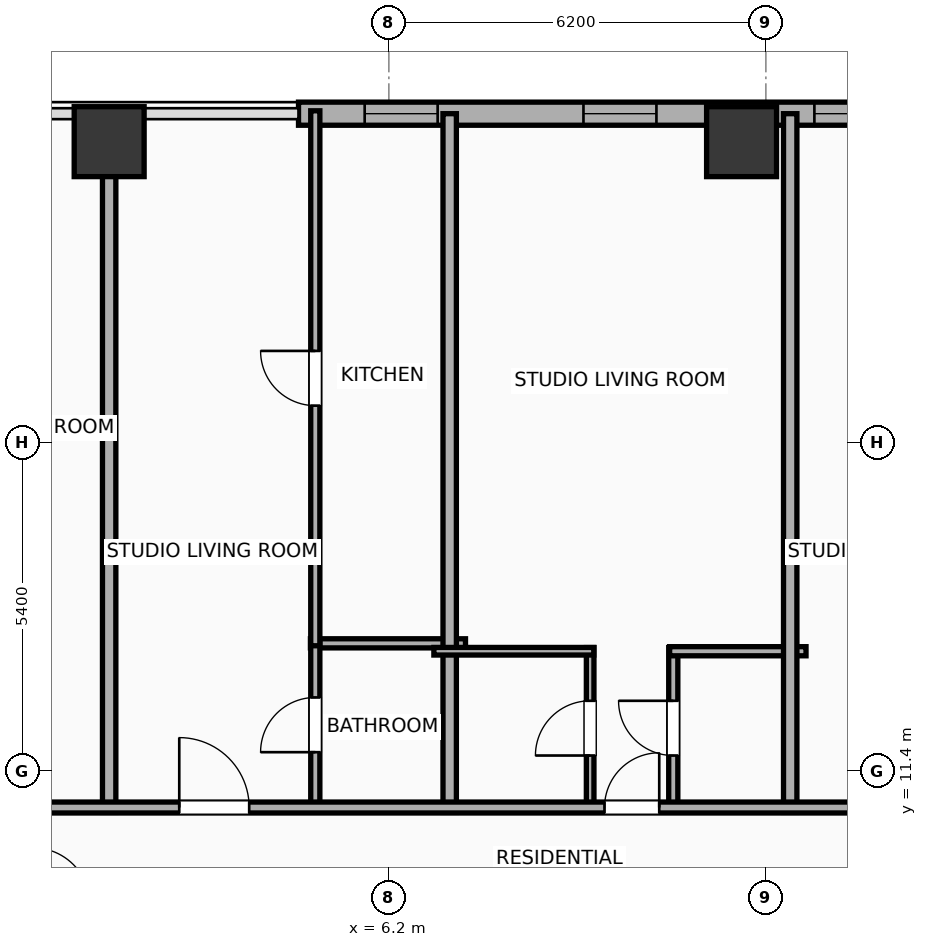
"""IFC4 building model, lengths in metres.
Left out: names, types, materials, properties, quantities, classifications, styles, units other than length and angle.
Written with IfcOpenShell. Run it as: python <this file> out.ifc"""

import sys

from ifc_helpers import new_model, si_unit, direction, frame, frame_2d, origin, origin_2d, place, context, subcontext, project, spatial, rectangle, hollow_rectangle, extrude, element, fill, save


model = new_model("IFC4")
c1 = context("Model", 3, precision=1e-05, world=origin(), true_north=direction((0.0, 1.0)))
c2 = subcontext(c1, "Body", "Model", "MODEL_VIEW")
j1 = project(units=[si_unit("LENGTHUNIT", "METRE"), si_unit("PLANEANGLEUNIT", "RADIAN")], contexts=[c1])
p1 = place(None, origin())
s1 = spatial("IfcSite", under=j1, at=p1, CompositionType="ELEMENT")
p2 = place(p1, origin())
s2 = spatial("IfcBuilding", under=s1, at=p2, CompositionType="ELEMENT")
p3 = place(p2, frame((0.0, 0.0, 61.1)))
s3 = spatial("IfcBuildingStorey", under=s2, at=p3, CompositionType="ELEMENT", Elevation=61.1)
for number, where, z_axis, x_axis in (
    (1, (12.0, 21.75, 0.0), (0.0, 0.0, 1.0), (1.0, 0.0, 0.0)),
    (2, (1.6, 21.75, 0.0), (0.0, 0.0, 1.0), (1.0, 0.0, 0.0)),
):
    element("IfcColumn", number, at=place(p3, frame(where, z_axis=z_axis, x_axis=x_axis)), inside=s3, PredefinedType="COLUMN", context=c2, shape_type="SweptSolid", body=[
        extrude(hollow_rectangle(XDim=1.15, YDim=1.15, WallThickness=0.04, at=origin_2d()), origin(), (0.0, 0.0, 1.0), 3.9),
    ])
p4 = place(p3, frame((4.714, 22.21, 0.0), z_axis=(0.0, 0.0, 1.0), x_axis=(1.0, 0.0, 0.0)))
e3 = element("IfcWall", 3, at=p4, inside=s3, PredefinedType="ELEMENTEDWALL", context=c2, shape_type="SweptSolid", body=[
    extrude(rectangle(XDim=17.667, YDim=0.38, at=frame_2d((8.833, 0.0))), origin(), (0.0, 0.0, 1.0), 3.65),
])
p5 = place(p4, frame((8.484, 0.0, 0.75)))
e4 = element("IfcOpeningElement", 4, at=p5, cuts=e3, PredefinedType="OPENING", context=c2, shape_type="SweptSolid", body=[
    extrude(rectangle(XDim=2.4, YDim=2.1, at=frame_2d((1.2, 1.05))), frame((0.0, 0.2, 0.0), z_axis=(0.0, -1.0, 0.0), x_axis=(1.0, 0.0, 0.0)), (0.0, 0.0, 1.0), 0.4),
])
p6 = place(p4, frame((1.088, 0.0, 0.75)))
e5 = element("IfcOpeningElement", 5, at=p6, cuts=e3, PredefinedType="OPENING", context=c2, shape_type="SweptSolid", body=[
    extrude(rectangle(XDim=1.2, YDim=2.05, at=frame_2d((0.6, 1.025))), frame((0.0, 0.2, 0.0), z_axis=(0.0, -1.0, 0.0), x_axis=(1.0, 0.0, 0.0)), (0.0, 0.0, 1.0), 0.4),
])
p7 = place(p4, frame((4.686, 0.0, 0.75)))
e6 = element("IfcOpeningElement", 6, at=p7, cuts=e3, PredefinedType="OPENING", context=c2, shape_type="SweptSolid", body=[
    extrude(rectangle(XDim=1.2, YDim=2.05, at=frame_2d((0.6, 1.025))), frame((0.0, 0.2, 0.0), z_axis=(0.0, -1.0, 0.0), x_axis=(1.0, 0.0, 0.0)), (0.0, 0.0, 1.0), 0.4),
])
p8 = place(p4, frame((11.981, 0.0, 0.75)))
e7 = element("IfcOpeningElement", 7, at=p8, cuts=e3, PredefinedType="OPENING", context=c2, shape_type="SweptSolid", body=[
    extrude(rectangle(XDim=1.2, YDim=2.05, at=frame_2d((0.6, 1.025))), frame((0.0, 0.2, 0.0), z_axis=(0.0, -1.0, 0.0), x_axis=(1.0, 0.0, 0.0)), (0.0, 0.0, 1.0), 0.4),
])
p9 = place(p4, frame((14.632, 0.0, 0.75)))
e8 = element("IfcOpeningElement", 8, at=p9, cuts=e3, PredefinedType="OPENING", context=c2, shape_type="SweptSolid", body=[
    extrude(rectangle(XDim=1.2, YDim=2.05, at=frame_2d((0.6, 1.025))), frame((0.0, 0.2, 0.0), z_axis=(0.0, -1.0, 0.0), x_axis=(1.0, 0.0, 0.0)), (0.0, 0.0, 1.0), 0.4),
])
p10 = place(p3, frame((1.6, 10.72, 0.0), z_axis=(0.0, 0.0, 1.0), x_axis=(0.0, 1.0, 0.0)))
e9 = element("IfcWall", 9, at=p10, inside=s3, PredefinedType="PARTITIONING", context=c2, shape_type="SweptSolid", body=[
    extrude(rectangle(XDim=11.49, YDim=0.22, at=frame_2d((5.745, 0.0))), origin(), (0.0, 0.0, 1.0), 2.94),
])
p11 = place(p3, frame((4.91, 13.5, 0.0), z_axis=(0.0, 0.0, 1.0), x_axis=(1.0, 0.0, 0.0)))
e10 = element("IfcWall", 10, at=p11, inside=s3, PredefinedType="PLUMBINGWALL", context=c2, shape_type="SweptSolid", body=[
    extrude(rectangle(XDim=2.55, YDim=0.15, at=frame_2d((1.275, 0.0))), origin(), (0.0, 0.0, 1.0), 3.65),
])
p12 = place(p3, frame((4.99, 10.78, 0.0), z_axis=(0.0, 0.0, 1.0), x_axis=(0.0, 1.0, 0.0)))
e11 = element("IfcWall", 11, at=p12, inside=s3, PredefinedType="PLUMBINGWALL", context=c2, shape_type="SweptSolid", body=[
    extrude(rectangle(XDim=2.76, YDim=0.15, at=frame_2d((1.38, 0.0))), origin(), (0.0, 0.0, 1.0), 3.65),
])
p13 = place(p12, frame((0.93, 0.0, 0.0)))
e12 = element("IfcOpeningElement", 12, at=p13, cuts=e11, PredefinedType="OPENING", context=c2, shape_type="SweptSolid", body=[
    extrude(rectangle(XDim=0.9, YDim=2.05, at=frame_2d((0.45, 1.025))), frame((0.0, 0.085, 0.0), z_axis=(0.0, -1.0, 0.0), x_axis=(1.0, 0.0, 0.0)), (0.0, 0.0, 1.0), 0.17),
])
p14 = place(p3, frame((4.99, 13.46, 0.0), z_axis=(0.0, 0.0, 1.0), x_axis=(0.0, 1.0, 0.0)))
e13 = element("IfcWall", 13, at=p14, inside=s3, PredefinedType="PLUMBINGWALL", context=c2, shape_type="SweptSolid", body=[
    extrude(rectangle(XDim=8.798, YDim=0.15, at=frame_2d((4.399, 0.0))), origin(), (0.0, 0.0, 1.0), 3.65),
])
p15 = place(p14, frame((3.949, 0.0, 0.0)))
e14 = element("IfcOpeningElement", 14, at=p15, cuts=e13, PredefinedType="OPENING", context=c2, shape_type="SweptSolid", body=[
    extrude(rectangle(XDim=0.9, YDim=2.05, at=frame_2d((0.45, 1.025))), frame((0.0, 0.085, 0.0), z_axis=(0.0, -1.0, 0.0), x_axis=(1.0, 0.0, 0.0)), (0.0, 0.0, 1.0), 0.17),
])
p16 = place(p3, frame((7.2, 10.72, 0.0), z_axis=(0.0, 0.0, 1.0), x_axis=(0.0, 1.0, 0.0)))
e15 = element("IfcWall", 15, at=p16, inside=s3, PredefinedType="PARTITIONING", context=c2, shape_type="SweptSolid", body=[
    extrude(rectangle(XDim=11.49, YDim=0.22, at=frame_2d((5.745, 0.0))), origin(), (0.0, 0.0, 1.0), 3.65),
])
p17 = place(p3, frame((9.51, 10.78, 0.0), z_axis=(0.0, 0.0, 1.0), x_axis=(0.0, 1.0, 0.0)))
e16 = element("IfcWall", 16, at=p17, inside=s3, PredefinedType="PARTITIONING", context=c2, shape_type="SweptSolid", body=[
    extrude(rectangle(XDim=2.65, YDim=0.125, at=frame_2d((1.325, 0.0))), origin(), (0.0, 0.0, 1.0), 3.65),
])
p18 = place(p17, frame((0.875, 0.0, 0.0)))
e17 = element("IfcOpeningElement", 17, at=p18, cuts=e16, PredefinedType="OPENING", context=c2, shape_type="SweptSolid", body=[
    extrude(rectangle(XDim=0.9, YDim=2.05, at=frame_2d((0.45, 1.025))), frame((0.0, 0.073, 0.0), z_axis=(0.0, -1.0, 0.0), x_axis=(1.0, 0.0, 0.0)), (0.0, 0.0, 1.0), 0.145),
])
p19 = place(p3, frame((10.877, 10.78, 0.0), z_axis=(0.0, 0.0, 1.0), x_axis=(0.0, 1.0, 0.0)))
e18 = element("IfcWall", 18, at=p19, inside=s3, PredefinedType="PLUMBINGWALL", context=c2, shape_type="SweptSolid", body=[
    extrude(rectangle(XDim=2.65, YDim=0.15, at=frame_2d((1.325, 0.0))), origin(), (0.0, 0.0, 1.0), 3.65),
])
p20 = place(p19, frame((0.875, 0.0, 0.0)))
e19 = element("IfcOpeningElement", 19, at=p20, cuts=e18, PredefinedType="OPENING", context=c2, shape_type="SweptSolid", body=[
    extrude(rectangle(XDim=0.9, YDim=2.05, at=frame_2d((0.45, 1.025))), frame((0.0, 0.085, 0.0), z_axis=(0.0, -1.0, 0.0), x_axis=(1.0, 0.0, 0.0)), (0.0, 0.0, 1.0), 0.17),
])
p21 = place(p3, frame((6.94, 13.37, 0.0), z_axis=(0.0, 0.0, 1.0), x_axis=(1.0, 0.0, 0.0)))
e20 = element("IfcWall", 20, at=p21, inside=s3, PredefinedType="PARTITIONING", context=c2, shape_type="SweptSolid", body=[
    extrude(rectangle(XDim=2.63, YDim=0.125, at=frame_2d((1.315, 0.0))), origin(), (0.0, 0.0, 1.0), 3.65),
])
p22 = place(p3, frame((10.817, 13.37, 0.0), z_axis=(0.0, 0.0, 1.0), x_axis=(1.0, 0.0, 0.0)))
e21 = element("IfcWall", 21, at=p22, inside=s3, PredefinedType="PLUMBINGWALL", context=c2, shape_type="SweptSolid", body=[
    extrude(rectangle(XDim=2.243, YDim=0.15, at=frame_2d((1.122, 0.0))), origin(), (0.0, 0.0, 1.0), 3.65),
])
p23 = place(p3, frame((12.8, 10.72, 0.0), z_axis=(0.0, 0.0, 1.0), x_axis=(0.0, 1.0, 0.0)))
e22 = element("IfcWall", 22, at=p23, inside=s3, PredefinedType="PARTITIONING", context=c2, shape_type="SweptSolid", body=[
    extrude(rectangle(XDim=11.49, YDim=0.22, at=frame_2d((5.745, 0.0))), origin(), (0.0, 0.0, 1.0), 3.65),
])
p24 = place(p3, frame((-33.41, 10.8, 0.0), z_axis=(0.0, 0.0, 1.0), x_axis=(1.0, 0.0, 0.0)))
e23 = element("IfcWall", 23, at=p24, inside=s3, PredefinedType="PARTITIONING", context=c2, shape_type="SweptSolid", body=[
    extrude(rectangle(XDim=59.62, YDim=0.18, at=frame_2d((29.81, 0.0))), origin(), (0.0, 0.0, 1.0), 3.65),
])
p25 = place(p24, frame((3.062, 0.0, 0.0)))
e24 = element("IfcOpeningElement", 24, at=p25, cuts=e23, PredefinedType="OPENING", context=c2, shape_type="SweptSolid", body=[
    extrude(rectangle(XDim=1.15, YDim=2.05, at=frame_2d((0.575, 1.025))), frame((0.0, 0.1, 0.0), z_axis=(0.0, -1.0, 0.0), x_axis=(1.0, 0.0, 0.0)), (0.0, 0.0, 1.0), 0.2),
])
p26 = place(p24, frame((10.312, 0.0, 0.0)))
e25 = element("IfcOpeningElement", 25, at=p26, cuts=e23, PredefinedType="OPENING", context=c2, shape_type="SweptSolid", body=[
    extrude(rectangle(XDim=1.15, YDim=2.05, at=frame_2d((0.575, 1.025))), frame((0.0, 0.1, 0.0), z_axis=(0.0, -1.0, 0.0), x_axis=(1.0, 0.0, 0.0)), (0.0, 0.0, 1.0), 0.2),
])
p27 = place(p24, frame((15.153, 0.0, 0.0)))
e26 = element("IfcOpeningElement", 26, at=p27, cuts=e23, PredefinedType="OPENING", context=c2, shape_type="SweptSolid", body=[
    extrude(rectangle(XDim=0.9, YDim=2.05, at=frame_2d((0.45, 1.025))), frame((0.0, 0.1, 0.0), z_axis=(0.0, -1.0, 0.0), x_axis=(1.0, 0.0, 0.0)), (0.0, 0.0, 1.0), 0.2),
])
p28 = place(p24, frame((21.508, 0.0, 0.0)))
e27 = element("IfcOpeningElement", 27, at=p28, cuts=e23, PredefinedType="OPENING", context=c2, shape_type="SweptSolid", body=[
    extrude(rectangle(XDim=1.15, YDim=2.05, at=frame_2d((0.575, 1.025))), frame((0.0, 0.1, 0.0), z_axis=(0.0, -1.0, 0.0), x_axis=(1.0, 0.0, 0.0)), (0.0, 0.0, 1.0), 0.2),
])
p29 = place(p24, frame((26.355, 0.0, 0.0)))
e28 = element("IfcOpeningElement", 28, at=p29, cuts=e23, PredefinedType="OPENING", context=c2, shape_type="SweptSolid", body=[
    extrude(rectangle(XDim=0.9, YDim=2.05, at=frame_2d((0.45, 1.025))), frame((0.0, 0.1, 0.0), z_axis=(0.0, -1.0, 0.0), x_axis=(1.0, 0.0, 0.0)), (0.0, 0.0, 1.0), 0.2),
])
p30 = place(p24, frame((32.753, 0.0, 0.0)))
e29 = element("IfcOpeningElement", 29, at=p30, cuts=e23, PredefinedType="OPENING", context=c2, shape_type="SweptSolid", body=[
    extrude(rectangle(XDim=1.15, YDim=2.05, at=frame_2d((0.575, 1.025))), frame((0.0, 0.1, 0.0), z_axis=(0.0, -1.0, 0.0), x_axis=(1.0, 0.0, 0.0)), (0.0, 0.0, 1.0), 0.2),
])
p31 = place(p24, frame((36.163, 0.0, 0.0)))
e30 = element("IfcOpeningElement", 30, at=p31, cuts=e23, PredefinedType="OPENING", context=c2, shape_type="SweptSolid", body=[
    extrude(rectangle(XDim=1.15, YDim=2.05, at=frame_2d((0.575, 1.025))), frame((0.0, 0.1, 0.0), z_axis=(0.0, -1.0, 0.0), x_axis=(1.0, 0.0, 0.0)), (0.0, 0.0, 1.0), 0.2),
])
p32 = place(p24, frame((43.156, 0.0, 0.0)))
e31 = element("IfcOpeningElement", 31, at=p32, cuts=e23, PredefinedType="OPENING", context=c2, shape_type="SweptSolid", body=[
    extrude(rectangle(XDim=0.9, YDim=2.05, at=frame_2d((0.45, 1.025))), frame((0.0, 0.1, 0.0), z_axis=(0.0, -1.0, 0.0), x_axis=(1.0, 0.0, 0.0)), (0.0, 0.0, 1.0), 0.2),
])
p33 = place(p24, frame((47.36, 0.0, 0.0)))
e32 = element("IfcOpeningElement", 32, at=p33, cuts=e23, PredefinedType="OPENING", context=c2, shape_type="SweptSolid", body=[
    extrude(rectangle(XDim=1.15, YDim=2.05, at=frame_2d((0.575, 1.025))), frame((0.0, 0.1, 0.0), z_axis=(0.0, -1.0, 0.0), x_axis=(1.0, 0.0, 0.0)), (0.0, 0.0, 1.0), 0.2),
])
p34 = place(p24, frame((55.337, 0.0, 0.0)))
e33 = element("IfcOpeningElement", 33, at=p34, cuts=e23, PredefinedType="OPENING", context=c2, shape_type="SweptSolid", body=[
    extrude(rectangle(XDim=1.15, YDim=2.05, at=frame_2d((0.575, 1.025))), frame((0.0, 0.1, 0.0), z_axis=(0.0, -1.0, 0.0), x_axis=(1.0, 0.0, 0.0)), (0.0, 0.0, 1.0), 0.2),
])
p35 = place(p5, origin())
e34 = element("IfcWindow", 34, at=p35, inside=s3, PartitioningType="SINGLE_PANEL", PredefinedType="WINDOW", context=c2, shape_type="SweptSolid", body=[
    extrude(rectangle(XDim=2.4, YDim=2.1, at=frame_2d((1.2, 1.05))), frame((0.0, 0.03, 0.0), z_axis=(0.0, -1.0, 0.0), x_axis=(1.0, 0.0, 0.0)), (0.0, 0.0, 1.0), 0.06),
])
fill(e4, e34)
p36 = place(p6, origin())
e35 = element("IfcWindow", 35, at=p36, inside=s3, PartitioningType="SINGLE_PANEL", PredefinedType="WINDOW", context=c2, shape_type="SweptSolid", body=[
    extrude(rectangle(XDim=1.2, YDim=2.05, at=frame_2d((0.6, 1.025))), frame((0.0, 0.03, 0.0), z_axis=(0.0, -1.0, 0.0), x_axis=(1.0, 0.0, 0.0)), (0.0, 0.0, 1.0), 0.06),
])
fill(e5, e35)
p37 = place(p7, origin())
e36 = element("IfcWindow", 36, at=p37, inside=s3, PartitioningType="SINGLE_PANEL", PredefinedType="WINDOW", context=c2, shape_type="SweptSolid", body=[
    extrude(rectangle(XDim=1.2, YDim=2.05, at=frame_2d((0.6, 1.025))), frame((0.0, 0.03, 0.0), z_axis=(0.0, -1.0, 0.0), x_axis=(1.0, 0.0, 0.0)), (0.0, 0.0, 1.0), 0.06),
])
fill(e6, e36)
p38 = place(p13, origin())
e37 = element("IfcDoor", 37, at=p38, inside=s3, OperationType="SINGLE_SWING_LEFT", PredefinedType="DOOR", context=c2, shape_type="SweptSolid", body=[
    extrude(rectangle(XDim=0.9, YDim=2.05, at=frame_2d((0.45, 1.025))), frame((0.0, 0.025, 0.0), z_axis=(0.0, -1.0, 0.0), x_axis=(1.0, 0.0, 0.0)), (0.0, 0.0, 1.0), 0.05),
])
fill(e12, e37)
p39 = place(p15, origin())
e38 = element("IfcDoor", 38, at=p39, inside=s3, OperationType="SINGLE_SWING_RIGHT", PredefinedType="DOOR", context=c2, shape_type="SweptSolid", body=[
    extrude(rectangle(XDim=0.9, YDim=2.05, at=frame_2d((0.45, 1.025))), frame((0.0, 0.025, 0.0), z_axis=(0.0, -1.0, 0.0), x_axis=(1.0, 0.0, 0.0)), (0.0, 0.0, 1.0), 0.05),
])
fill(e14, e38)
p40 = place(p18, origin())
e39 = element("IfcDoor", 39, at=p40, inside=s3, OperationType="SINGLE_SWING_LEFT", PredefinedType="DOOR", context=c2, shape_type="SweptSolid", body=[
    extrude(rectangle(XDim=0.9, YDim=2.05, at=frame_2d((0.45, 1.025))), frame((0.0, 0.025, 0.0), z_axis=(0.0, -1.0, 0.0), x_axis=(1.0, 0.0, 0.0)), (0.0, 0.0, 1.0), 0.05),
])
fill(e17, e39)
p41 = place(p20, origin())
e40 = element("IfcDoor", 40, at=p41, inside=s3, OperationType="SINGLE_SWING_RIGHT", PredefinedType="DOOR", context=c2, shape_type="SweptSolid", body=[
    extrude(rectangle(XDim=0.9, YDim=2.05, at=frame_2d((0.45, 1.025))), frame((0.0, 0.025, 0.0), z_axis=(0.0, -1.0, 0.0), x_axis=(1.0, 0.0, 0.0)), (0.0, 0.0, 1.0), 0.05),
])
fill(e19, e40)
p42 = place(p31, origin())
e41 = element("IfcDoor", 41, at=p42, inside=s3, OperationType="SINGLE_SWING_LEFT", PredefinedType="DOOR", context=c2, shape_type="SweptSolid", body=[
    extrude(rectangle(XDim=1.15, YDim=2.05, at=frame_2d((0.575, 1.025))), frame((0.0, 0.025, 0.0), z_axis=(0.0, -1.0, 0.0), x_axis=(1.0, 0.0, 0.0)), (0.0, 0.0, 1.0), 0.05),
])
fill(e30, e41)
p43 = place(p32, origin())
e42 = element("IfcDoor", 42, at=p43, inside=s3, OperationType="SINGLE_SWING_RIGHT", PredefinedType="DOOR", context=c2, shape_type="SweptSolid", body=[
    extrude(rectangle(XDim=0.9, YDim=2.05, at=frame_2d((0.45, 1.025))), frame((0.0, 0.025, 0.0), z_axis=(0.0, -1.0, 0.0), x_axis=(1.0, 0.0, 0.0)), (0.0, 0.0, 1.0), 0.05),
])
fill(e31, e42)
save(model, sys.argv[1])
